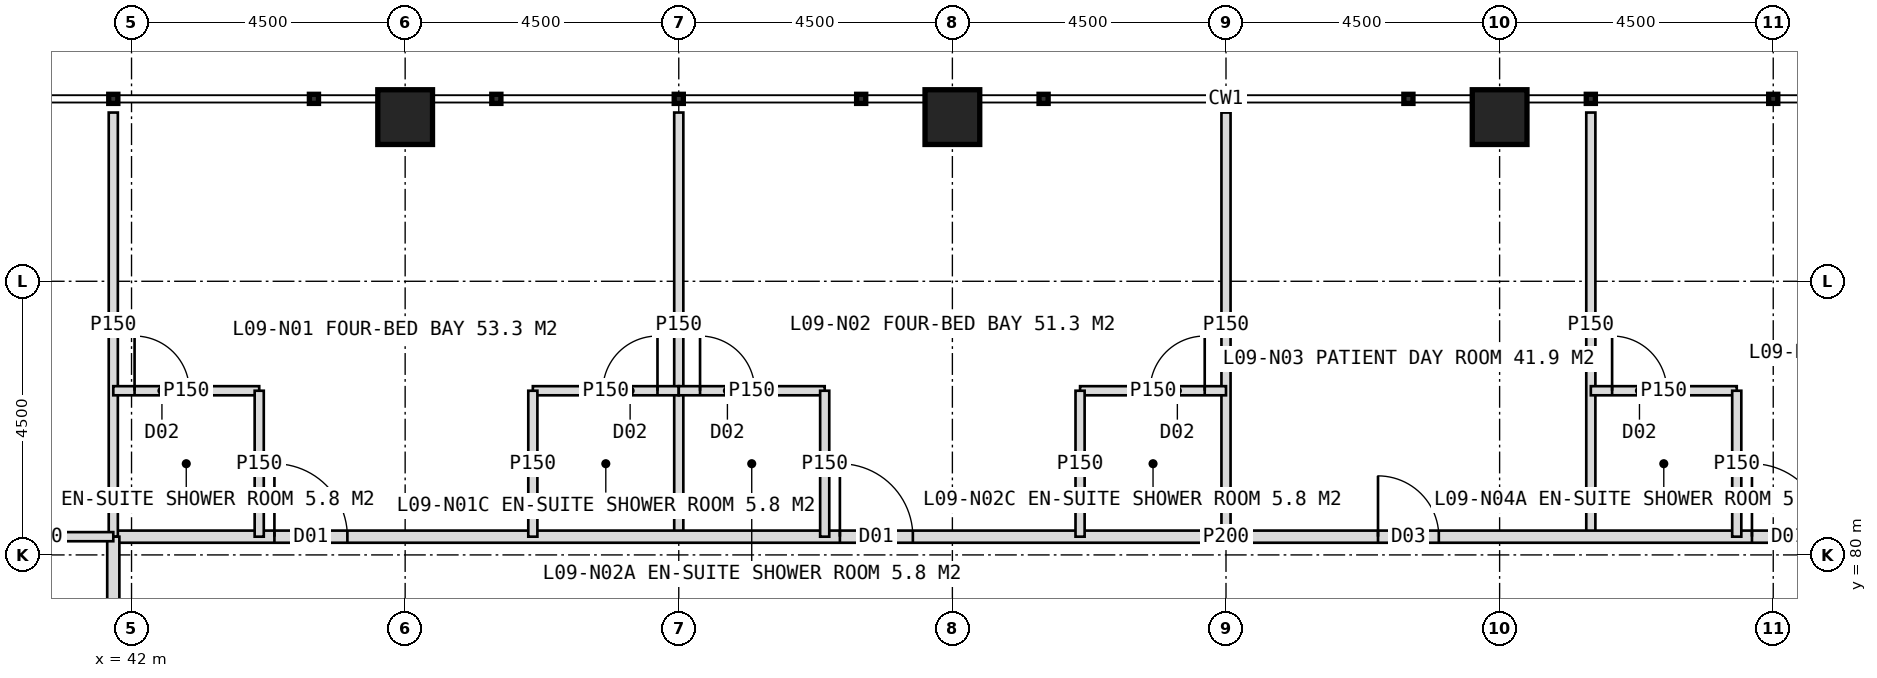
"""IFC4 building model, lengths in metres.
Left out: names, types, materials, properties, quantities, classifications, styles, units other than length and angle.
Written with IfcOpenShell. Run it as: python <this file> out.ifc"""

import sys

from ifc_helpers import new_model, si_unit, direction, frame, frame_2d, origin, origin_2d, place, context, subcontext, project, spatial, rectangle, hollow_rectangle, extrude, element, fill, save


model = new_model("IFC4")
c1 = context("Model", 3, precision=1e-05, world=origin(), true_north=direction((0.0, 1.0)))
c2 = subcontext(c1, "Body", "Model", "MODEL_VIEW")
j1 = project(units=[si_unit("LENGTHUNIT", "METRE"), si_unit("PLANEANGLEUNIT", "RADIAN")], contexts=[c1])
p1 = place(None, origin())
s1 = spatial("IfcSite", under=j1, at=p1, CompositionType="ELEMENT")
p2 = place(p1, origin())
s2 = spatial("IfcBuilding", under=s1, at=p2, CompositionType="ELEMENT")
p3 = place(p2, frame((0.0, 0.0, 43.0)))
s3 = spatial("IfcBuildingStorey", under=s2, at=p3, CompositionType="ELEMENT", Elevation=43.0)
for number, where, z_axis, x_axis in (
    (1, (46.5, 87.2, 0.0), (0.0, 0.0, 1.0), (1.0, 0.0, 0.0)),
    (2, (55.5, 87.2, 0.0), (0.0, 0.0, 1.0), (1.0, 0.0, 0.0)),
    (3, (64.5, 87.2, 0.0), (0.0, 0.0, 1.0), (1.0, 0.0, 0.0)),
):
    element("IfcColumn", number, at=place(p3, frame(where, z_axis=z_axis, x_axis=x_axis)), inside=s3, PredefinedType="COLUMN", context=c2, shape_type="SweptSolid", body=[
        extrude(hollow_rectangle(XDim=0.9, YDim=0.9, WallThickness=0.08, at=origin_2d()), origin(), (0.0, 0.0, 1.0), 4.0),
    ])
p4 = place(p3, frame((51.0, 80.3, 0.0), z_axis=(0.0, 0.0, 1.0), x_axis=(0.0, 1.0, 0.0)))
e4 = element("IfcWall", 4, at=p4, inside=s3, PredefinedType="PARTITIONING", context=c2, shape_type="SweptSolid", body=[
    extrude(rectangle(XDim=6.975, YDim=0.15, at=frame_2d((3.487, 0.0))), origin(), (0.0, 0.0, 1.0), 3.75),
])
p5 = place(p3, frame((60.0, 80.3, 0.0), z_axis=(0.0, 0.0, 1.0), x_axis=(0.0, 1.0, 0.0)))
e5 = element("IfcWall", 5, at=p5, inside=s3, PredefinedType="PARTITIONING", context=c2, shape_type="SweptSolid", body=[
    extrude(rectangle(XDim=6.975, YDim=0.15, at=frame_2d((3.487, 0.0))), origin(), (0.0, 0.0, 1.0), 2.75),
])
p6 = place(p3, frame((66.0, 80.3, 0.0), z_axis=(0.0, 0.0, 1.0), x_axis=(0.0, 1.0, 0.0)))
e6 = element("IfcWall", 6, at=p6, inside=s3, PredefinedType="PARTITIONING", context=c2, shape_type="SweptSolid", body=[
    extrude(rectangle(XDim=6.975, YDim=0.15, at=frame_2d((3.487, 0.0))), origin(), (0.0, 0.0, 1.0), 3.75),
])
p7 = place(p3, frame((41.7, 80.3, 0.0), z_axis=(0.0, 0.0, 1.0), x_axis=(1.0, 0.0, 0.0)))
e7 = element("IfcWall", 7, at=p7, inside=s3, PredefinedType="PARTITIONING", context=c2, shape_type="SweptSolid", body=[
    extrude(rectangle(XDim=36.6, YDim=0.2, at=frame_2d((18.3, 0.0))), origin(), (0.0, 0.0, 1.0), 3.75),
])
p8 = place(p7, frame((2.65, 0.0, 0.0)))
e8 = element("IfcOpeningElement", 8, at=p8, cuts=e7, PredefinedType="OPENING", context=c2, shape_type="SweptSolid", body=[
    extrude(rectangle(XDim=1.2, YDim=2.2, at=frame_2d((0.6, 1.1))), frame((0.0, 0.11, 0.0), z_axis=(0.0, -1.0, 0.0), x_axis=(1.0, 0.0, 0.0)), (0.0, 0.0, 1.0), 0.22),
])
p9 = place(p7, frame((11.95, 0.0, 0.0)))
e9 = element("IfcOpeningElement", 9, at=p9, cuts=e7, PredefinedType="OPENING", context=c2, shape_type="SweptSolid", body=[
    extrude(rectangle(XDim=1.2, YDim=2.2, at=frame_2d((0.6, 1.1))), frame((0.0, 0.11, 0.0), z_axis=(0.0, -1.0, 0.0), x_axis=(1.0, 0.0, 0.0)), (0.0, 0.0, 1.0), 0.22),
])
p10 = place(p7, frame((20.8, 0.0, 0.0)))
e10 = element("IfcOpeningElement", 10, at=p10, cuts=e7, PredefinedType="OPENING", context=c2, shape_type="SweptSolid", body=[
    extrude(rectangle(XDim=1.0, YDim=2.1, at=frame_2d((0.5, 1.05))), frame((0.0, 0.11, 0.0), z_axis=(0.0, -1.0, 0.0), x_axis=(1.0, 0.0, 0.0)), (0.0, 0.0, 1.0), 0.22),
])
p11 = place(p7, frame((26.95, 0.0, 0.0)))
e11 = element("IfcOpeningElement", 11, at=p11, cuts=e7, PredefinedType="OPENING", context=c2, shape_type="SweptSolid", body=[
    extrude(rectangle(XDim=1.2, YDim=2.2, at=frame_2d((0.6, 1.1))), frame((0.0, 0.11, 0.0), z_axis=(0.0, -1.0, 0.0), x_axis=(1.0, 0.0, 0.0)), (0.0, 0.0, 1.0), 0.22),
])
p12 = place(p3, frame((41.7, 80.3, 0.0), z_axis=(0.0, 0.0, 1.0), x_axis=(0.0, 1.0, 0.0)))
e12 = element("IfcWall", 12, at=p12, inside=s3, PredefinedType="PARTITIONING", context=c2, shape_type="SweptSolid", body=[
    extrude(rectangle(XDim=6.975, YDim=0.15, at=frame_2d((3.487, 0.0))), origin(), (0.0, 0.0, 1.0), 3.75),
])
p13 = place(p3, frame((41.7, 82.7, 0.0), z_axis=(0.0, 0.0, 1.0), x_axis=(1.0, 0.0, 0.0)))
e13 = element("IfcWall", 13, at=p13, inside=s3, PredefinedType="PARTITIONING", context=c2, shape_type="SweptSolid", body=[
    extrude(rectangle(XDim=2.4, YDim=0.15, at=frame_2d((1.2, 0.0))), origin(), (0.0, 0.0, 1.0), 2.95),
])
p14 = place(p13, frame((0.35, 0.0, 0.0)))
e14 = element("IfcOpeningElement", 14, at=p14, cuts=e13, PredefinedType="OPENING", context=c2, shape_type="SweptSolid", body=[
    extrude(rectangle(XDim=0.9, YDim=2.1, at=frame_2d((0.45, 1.05))), frame((0.0, 0.085, 0.0), z_axis=(0.0, -1.0, 0.0), x_axis=(1.0, 0.0, 0.0)), (0.0, 0.0, 1.0), 0.17),
])
p15 = place(p3, frame((44.1, 80.3, 0.0), z_axis=(0.0, 0.0, 1.0), x_axis=(0.0, 1.0, 0.0)))
e15 = element("IfcWall", 15, at=p15, inside=s3, PredefinedType="PARTITIONING", context=c2, shape_type="SweptSolid", body=[
    extrude(rectangle(XDim=2.4, YDim=0.15, at=frame_2d((1.2, 0.0))), origin(), (0.0, 0.0, 1.0), 3.75),
])
p16 = place(p3, frame((48.6, 82.7, 0.0), z_axis=(0.0, 0.0, 1.0), x_axis=(1.0, 0.0, 0.0)))
e16 = element("IfcWall", 16, at=p16, inside=s3, PredefinedType="PARTITIONING", context=c2, shape_type="SweptSolid", body=[
    extrude(rectangle(XDim=2.4, YDim=0.15, at=frame_2d((1.2, 0.0))), origin(), (0.0, 0.0, 1.0), 3.75),
])
p17 = place(p16, frame((1.15, 0.0, 0.0)))
e17 = element("IfcOpeningElement", 17, at=p17, cuts=e16, PredefinedType="OPENING", context=c2, shape_type="SweptSolid", body=[
    extrude(rectangle(XDim=0.9, YDim=2.1, at=frame_2d((0.45, 1.05))), frame((0.0, 0.085, 0.0), z_axis=(0.0, -1.0, 0.0), x_axis=(1.0, 0.0, 0.0)), (0.0, 0.0, 1.0), 0.17),
])
p18 = place(p3, frame((48.6, 80.3, 0.0), z_axis=(0.0, 0.0, 1.0), x_axis=(0.0, 1.0, 0.0)))
e18 = element("IfcWall", 18, at=p18, inside=s3, PredefinedType="PARTITIONING", context=c2, shape_type="SweptSolid", body=[
    extrude(rectangle(XDim=2.4, YDim=0.15, at=frame_2d((1.2, 0.0))), origin(), (0.0, 0.0, 1.0), 3.75),
])
p19 = place(p3, frame((51.0, 82.7, 0.0), z_axis=(0.0, 0.0, 1.0), x_axis=(1.0, 0.0, 0.0)))
e19 = element("IfcWall", 19, at=p19, inside=s3, PredefinedType="PARTITIONING", context=c2, shape_type="SweptSolid", body=[
    extrude(rectangle(XDim=2.4, YDim=0.15, at=frame_2d((1.2, 0.0))), origin(), (0.0, 0.0, 1.0), 3.75),
])
p20 = place(p19, frame((0.35, 0.0, 0.0)))
e20 = element("IfcOpeningElement", 20, at=p20, cuts=e19, PredefinedType="OPENING", context=c2, shape_type="SweptSolid", body=[
    extrude(rectangle(XDim=0.9, YDim=2.1, at=frame_2d((0.45, 1.05))), frame((0.0, 0.085, 0.0), z_axis=(0.0, -1.0, 0.0), x_axis=(1.0, 0.0, 0.0)), (0.0, 0.0, 1.0), 0.17),
])
p21 = place(p3, frame((53.4, 80.3, 0.0), z_axis=(0.0, 0.0, 1.0), x_axis=(0.0, 1.0, 0.0)))
e21 = element("IfcWall", 21, at=p21, inside=s3, PredefinedType="PARTITIONING", context=c2, shape_type="SweptSolid", body=[
    extrude(rectangle(XDim=2.4, YDim=0.15, at=frame_2d((1.2, 0.0))), origin(), (0.0, 0.0, 1.0), 3.75),
])
p22 = place(p3, frame((57.6, 82.7, 0.0), z_axis=(0.0, 0.0, 1.0), x_axis=(1.0, 0.0, 0.0)))
e22 = element("IfcWall", 22, at=p22, inside=s3, PredefinedType="PARTITIONING", context=c2, shape_type="SweptSolid", body=[
    extrude(rectangle(XDim=2.4, YDim=0.15, at=frame_2d((1.2, 0.0))), origin(), (0.0, 0.0, 1.0), 3.75),
])
p23 = place(p22, frame((1.15, 0.0, 0.0)))
e23 = element("IfcOpeningElement", 23, at=p23, cuts=e22, PredefinedType="OPENING", context=c2, shape_type="SweptSolid", body=[
    extrude(rectangle(XDim=0.9, YDim=2.1, at=frame_2d((0.45, 1.05))), frame((0.0, 0.085, 0.0), z_axis=(0.0, -1.0, 0.0), x_axis=(1.0, 0.0, 0.0)), (0.0, 0.0, 1.0), 0.17),
])
p24 = place(p3, frame((57.6, 80.3, 0.0), z_axis=(0.0, 0.0, 1.0), x_axis=(0.0, 1.0, 0.0)))
e24 = element("IfcWall", 24, at=p24, inside=s3, PredefinedType="PARTITIONING", context=c2, shape_type="SweptSolid", body=[
    extrude(rectangle(XDim=2.4, YDim=0.15, at=frame_2d((1.2, 0.0))), origin(), (0.0, 0.0, 1.0), 3.75),
])
p25 = place(p3, frame((66.0, 82.7, 0.0), z_axis=(0.0, 0.0, 1.0), x_axis=(1.0, 0.0, 0.0)))
e25 = element("IfcWall", 25, at=p25, inside=s3, PredefinedType="PARTITIONING", context=c2, shape_type="SweptSolid", body=[
    extrude(rectangle(XDim=2.4, YDim=0.15, at=frame_2d((1.2, 0.0))), origin(), (0.0, 0.0, 1.0), 3.75),
])
p26 = place(p25, frame((0.35, 0.0, 0.0)))
e26 = element("IfcOpeningElement", 26, at=p26, cuts=e25, PredefinedType="OPENING", context=c2, shape_type="SweptSolid", body=[
    extrude(rectangle(XDim=0.9, YDim=2.1, at=frame_2d((0.45, 1.05))), frame((0.0, 0.085, 0.0), z_axis=(0.0, -1.0, 0.0), x_axis=(1.0, 0.0, 0.0)), (0.0, 0.0, 1.0), 0.17),
])
p27 = place(p3, frame((68.4, 80.3, 0.0), z_axis=(0.0, 0.0, 1.0), x_axis=(0.0, 1.0, 0.0)))
e27 = element("IfcWall", 27, at=p27, inside=s3, PredefinedType="PARTITIONING", context=c2, shape_type="SweptSolid", body=[
    extrude(rectangle(XDim=2.4, YDim=0.15, at=frame_2d((1.2, 0.0))), origin(), (0.0, 0.0, 1.0), 3.75),
])
p28 = place(p3, frame((41.7, 43.7, 0.0), z_axis=(0.0, 0.0, 1.0), x_axis=(0.0, 1.0, 0.0)))
e28 = element("IfcWall", 28, at=p28, inside=s3, PredefinedType="PARTITIONING", context=c2, shape_type="SweptSolid", body=[
    extrude(rectangle(XDim=36.6, YDim=0.2, at=frame_2d((18.3, 0.0))), origin(), (0.0, 0.0, 1.0), 3.75),
])
p29 = place(p28, frame((2.65, 0.0, 0.0)))
e29 = element("IfcOpeningElement", 29, at=p29, cuts=e28, PredefinedType="OPENING", context=c2, shape_type="SweptSolid", body=[
    extrude(rectangle(XDim=1.2, YDim=2.2, at=frame_2d((0.6, 1.1))), frame((0.0, 0.11, 0.0), z_axis=(0.0, -1.0, 0.0), x_axis=(1.0, 0.0, 0.0)), (0.0, 0.0, 1.0), 0.22),
])
p30 = place(p28, frame((8.95, 0.0, 0.0)))
e30 = element("IfcOpeningElement", 30, at=p30, cuts=e28, PredefinedType="OPENING", context=c2, shape_type="SweptSolid", body=[
    extrude(rectangle(XDim=1.2, YDim=2.2, at=frame_2d((0.6, 1.1))), frame((0.0, 0.11, 0.0), z_axis=(0.0, -1.0, 0.0), x_axis=(1.0, 0.0, 0.0)), (0.0, 0.0, 1.0), 0.22),
])
p31 = place(p28, frame((14.95, 0.0, 0.0)))
e31 = element("IfcOpeningElement", 31, at=p31, cuts=e28, PredefinedType="OPENING", context=c2, shape_type="SweptSolid", body=[
    extrude(rectangle(XDim=1.2, YDim=2.2, at=frame_2d((0.6, 1.1))), frame((0.0, 0.11, 0.0), z_axis=(0.0, -1.0, 0.0), x_axis=(1.0, 0.0, 0.0)), (0.0, 0.0, 1.0), 0.22),
])
p32 = place(p28, frame((20.95, 0.0, 0.0)))
e32 = element("IfcOpeningElement", 32, at=p32, cuts=e28, PredefinedType="OPENING", context=c2, shape_type="SweptSolid", body=[
    extrude(rectangle(XDim=1.2, YDim=2.2, at=frame_2d((0.6, 1.1))), frame((0.0, 0.11, 0.0), z_axis=(0.0, -1.0, 0.0), x_axis=(1.0, 0.0, 0.0)), (0.0, 0.0, 1.0), 0.22),
])
p33 = place(p28, frame((29.95, 0.0, 0.0)))
e33 = element("IfcOpeningElement", 33, at=p33, cuts=e28, PredefinedType="OPENING", context=c2, shape_type="SweptSolid", body=[
    extrude(rectangle(XDim=1.2, YDim=2.2, at=frame_2d((0.6, 1.1))), frame((0.0, 0.11, 0.0), z_axis=(0.0, -1.0, 0.0), x_axis=(1.0, 0.0, 0.0)), (0.0, 0.0, 1.0), 0.22),
])
p34 = place(p3, frame((41.7, 80.3, 0.0), z_axis=(0.0, 0.0, 1.0), x_axis=(-1.0, 0.0, 0.0)))
e34 = element("IfcWall", 34, at=p34, inside=s3, PredefinedType="PARTITIONING", context=c2, shape_type="SweptSolid", body=[
    extrude(rectangle(XDim=2.4, YDim=0.15, at=frame_2d((1.2, 0.0))), origin(), (0.0, 0.0, 1.0), 3.75),
])
p35 = place(p8, origin())
e35 = element("IfcDoor", 35, at=p35, inside=s3, OperationType="SINGLE_SWING_LEFT", PredefinedType="DOOR", context=c2, shape_type="SweptSolid", body=[
    extrude(rectangle(XDim=1.2, YDim=2.2, at=frame_2d((0.6, 1.1))), frame((0.0, 0.025, 0.0), z_axis=(0.0, -1.0, 0.0), x_axis=(1.0, 0.0, 0.0)), (0.0, 0.0, 1.0), 0.05),
])
fill(e8, e35)
p36 = place(p14, origin())
e36 = element("IfcDoor", 36, at=p36, inside=s3, OperationType="SINGLE_SWING_LEFT", PredefinedType="DOOR", context=c2, shape_type="SweptSolid", body=[
    extrude(rectangle(XDim=0.9, YDim=2.1, at=frame_2d((0.45, 1.05))), frame((0.0, 0.025, 0.0), z_axis=(0.0, -1.0, 0.0), x_axis=(1.0, 0.0, 0.0)), (0.0, 0.0, 1.0), 0.05),
])
fill(e14, e36)
p37 = place(p17, origin())
e37 = element("IfcDoor", 37, at=p37, inside=s3, OperationType="SINGLE_SWING_RIGHT", PredefinedType="DOOR", context=c2, shape_type="SweptSolid", body=[
    extrude(rectangle(XDim=0.9, YDim=2.1, at=frame_2d((0.45, 1.05))), frame((0.0, 0.025, 0.0), z_axis=(0.0, -1.0, 0.0), x_axis=(1.0, 0.0, 0.0)), (0.0, 0.0, 1.0), 0.05),
])
fill(e17, e37)
p38 = place(p9, origin())
e38 = element("IfcDoor", 38, at=p38, inside=s3, OperationType="SINGLE_SWING_LEFT", PredefinedType="DOOR", context=c2, shape_type="SweptSolid", body=[
    extrude(rectangle(XDim=1.2, YDim=2.2, at=frame_2d((0.6, 1.1))), frame((0.0, 0.025, 0.0), z_axis=(0.0, -1.0, 0.0), x_axis=(1.0, 0.0, 0.0)), (0.0, 0.0, 1.0), 0.05),
])
fill(e9, e38)
p39 = place(p20, origin())
e39 = element("IfcDoor", 39, at=p39, inside=s3, OperationType="SINGLE_SWING_LEFT", PredefinedType="DOOR", context=c2, shape_type="SweptSolid", body=[
    extrude(rectangle(XDim=0.9, YDim=2.1, at=frame_2d((0.45, 1.05))), frame((0.0, 0.025, 0.0), z_axis=(0.0, -1.0, 0.0), x_axis=(1.0, 0.0, 0.0)), (0.0, 0.0, 1.0), 0.05),
])
fill(e20, e39)
p40 = place(p23, origin())
e40 = element("IfcDoor", 40, at=p40, inside=s3, OperationType="SINGLE_SWING_RIGHT", PredefinedType="DOOR", context=c2, shape_type="SweptSolid", body=[
    extrude(rectangle(XDim=0.9, YDim=2.1, at=frame_2d((0.45, 1.05))), frame((0.0, 0.025, 0.0), z_axis=(0.0, -1.0, 0.0), x_axis=(1.0, 0.0, 0.0)), (0.0, 0.0, 1.0), 0.05),
])
fill(e23, e40)
p41 = place(p10, origin())
e41 = element("IfcDoor", 41, at=p41, inside=s3, OperationType="SINGLE_SWING_LEFT", PredefinedType="DOOR", context=c2, shape_type="SweptSolid", body=[
    extrude(rectangle(XDim=1.0, YDim=2.1, at=frame_2d((0.5, 1.05))), frame((0.0, 0.025, 0.0), z_axis=(0.0, -1.0, 0.0), x_axis=(1.0, 0.0, 0.0)), (0.0, 0.0, 1.0), 0.05),
])
fill(e10, e41)
p42 = place(p11, origin())
e42 = element("IfcDoor", 42, at=p42, inside=s3, OperationType="SINGLE_SWING_LEFT", PredefinedType="DOOR", context=c2, shape_type="SweptSolid", body=[
    extrude(rectangle(XDim=1.2, YDim=2.2, at=frame_2d((0.6, 1.1))), frame((0.0, 0.025, 0.0), z_axis=(0.0, -1.0, 0.0), x_axis=(1.0, 0.0, 0.0)), (0.0, 0.0, 1.0), 0.05),
])
fill(e11, e42)
p43 = place(p26, origin())
e43 = element("IfcDoor", 43, at=p43, inside=s3, OperationType="SINGLE_SWING_LEFT", PredefinedType="DOOR", context=c2, shape_type="SweptSolid", body=[
    extrude(rectangle(XDim=0.9, YDim=2.1, at=frame_2d((0.45, 1.05))), frame((0.0, 0.025, 0.0), z_axis=(0.0, -1.0, 0.0), x_axis=(1.0, 0.0, 0.0)), (0.0, 0.0, 1.0), 0.05),
])
fill(e26, e43)
save(model, sys.argv[1])
